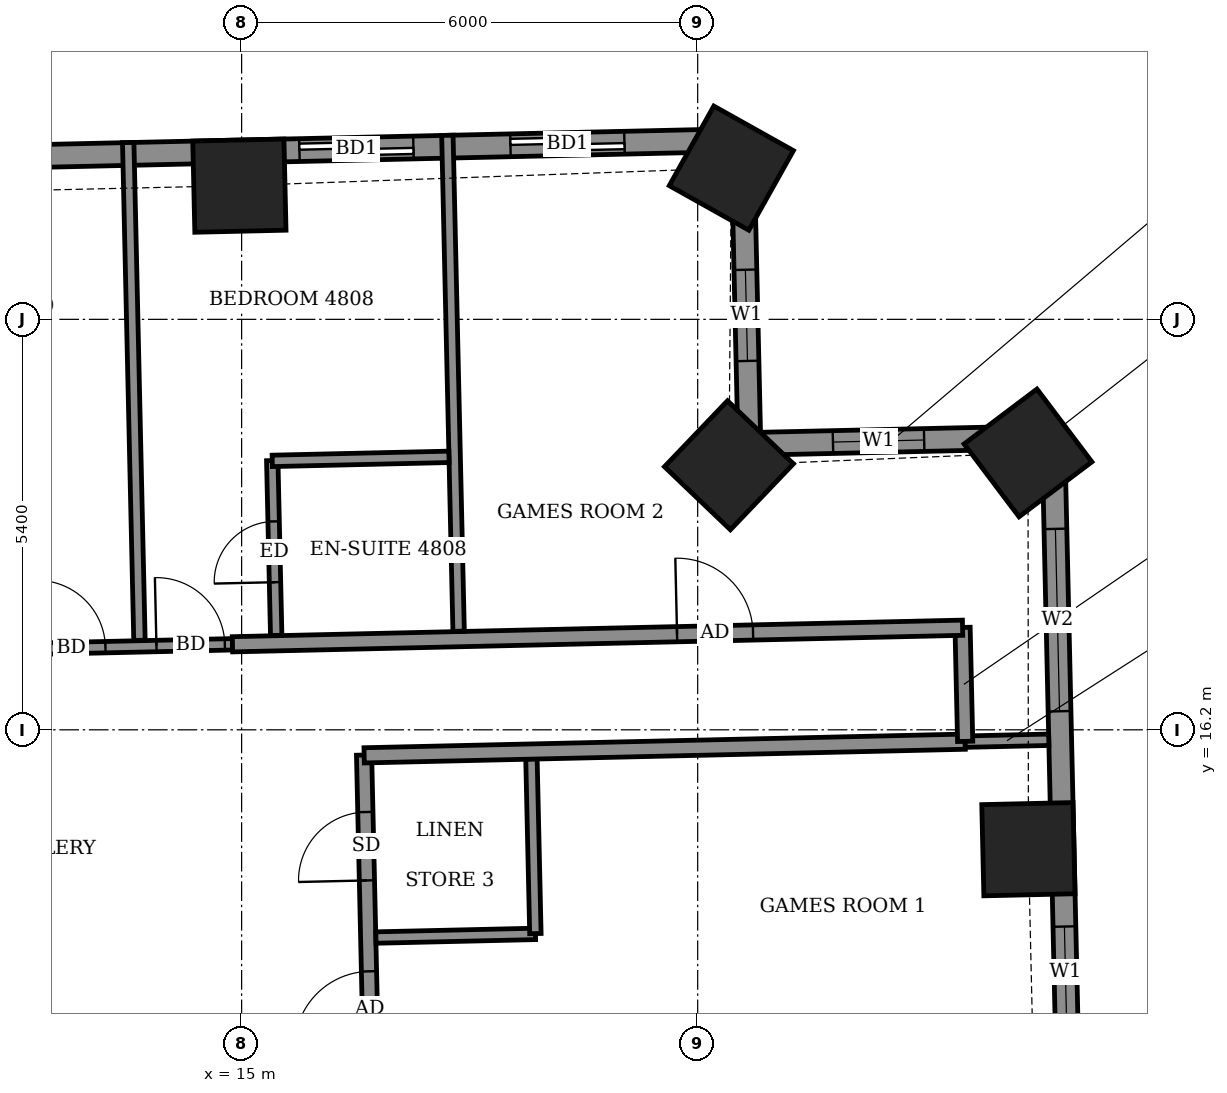
"""IFC4 building model, lengths in metres.
Left out: names, types, materials, properties, quantities, classifications, styles, units other than length and angle.
Written with IfcOpenShell. Run it as: python <this file> out.ifc"""

import sys

from ifc_helpers import new_model, si_unit, direction, frame, frame_2d, origin, origin_2d, place, context, subcontext, project, spatial, rectangle, extrude, element, fill, save


model = new_model("IFC4")
c1 = context("Model", 3, precision=1e-05, world=origin(), true_north=direction((0.0, 1.0)))
c2 = subcontext(c1, "Body", "Model", "MODEL_VIEW")
j1 = project(units=[si_unit("LENGTHUNIT", "METRE"), si_unit("PLANEANGLEUNIT", "RADIAN")], contexts=[c1])
p1 = place(None, origin())
s1 = spatial("IfcSite", under=j1, at=p1, CompositionType="ELEMENT")
p2 = place(p1, origin())
s2 = spatial("IfcBuilding", under=s1, at=p2, CompositionType="ELEMENT")
p3 = place(p2, frame((0.0, 0.0, 189.7)))
s3 = spatial("IfcBuildingStorey", under=s2, at=p3, CompositionType="ELEMENT", Elevation=189.7)
for number, where, z_axis, x_axis in (
    (1, (25.351, 14.629, -0.55), (0.0, 0.0, 1.0), (-0.023, 1.0, 0.0)),
    (2, (25.346, 19.843, -0.55), (0.0, 0.0, 1.0), (-0.602, 0.798, 0.0)),
    (3, (21.411, 19.68, -0.55), (0.0, 0.0, 1.0), (-0.723, 0.691, 0.0)),
    (4, (21.443, 23.589, -0.55), (0.0, 0.0, 1.0), (-0.873, 0.488, 0.0)),
    (5, (14.971, 23.359, -0.55), (0.0, 0.0, 1.0), (-1.0, -0.023, 0.0)),
):
    element("IfcColumn", number, at=place(p3, frame(where, z_axis=z_axis, x_axis=x_axis)), inside=s3, PredefinedType="COLUMN", context=c2, shape_type="SweptSolid", body=[
        extrude(rectangle(XDim=1.2, YDim=1.2, at=origin_2d()), origin(), (0.0, 0.0, 1.0), 3.6),
    ])
p4 = place(p3, frame((25.936, 8.697, 0.0), z_axis=(0.0, 0.0, 1.0), x_axis=(-0.022636437932, 0.99974376301, 0.0)))
e6 = element("IfcWall", 6, at=p4, inside=s3, PredefinedType="SOLIDWALL", context=c2, shape_type="SweptSolid", body=[
    extrude(rectangle(XDim=11.357, YDim=0.3, at=frame_2d((5.678, 0.0))), origin(), (0.0, 0.0, 1.0), 3.05),
])
p5 = place(p4, frame((1.161, 0.0, 0.0)))
e7 = element("IfcOpeningElement", 7, at=p5, cuts=e6, PredefinedType="OPENING", context=c2, shape_type="SweptSolid", body=[
    extrude(rectangle(XDim=1.5, YDim=2.4, at=frame_2d((0.75, 1.2))), frame((0.0, 0.16, 0.0), z_axis=(0.0, -1.0, 0.0), x_axis=(1.0, 0.0, 0.0)), (0.0, 0.0, 1.0), 0.32),
])
p6 = place(p4, frame((3.716, 0.0, 0.9)))
e8 = element("IfcOpeningElement", 8, at=p6, cuts=e6, PredefinedType="OPENING", context=c2, shape_type="SweptSolid", body=[
    extrude(rectangle(XDim=1.2, YDim=1.5, at=frame_2d((0.6, 0.75))), frame((0.0, 0.16, 0.0), z_axis=(0.0, -1.0, 0.0), x_axis=(1.0, 0.0, 0.0)), (0.0, 0.0, 1.0), 0.32),
])
p7 = place(p4, frame((7.749, 0.0, 0.9)))
e9 = element("IfcOpeningElement", 9, at=p7, cuts=e6, PredefinedType="OPENING", context=c2, shape_type="SweptSolid", body=[
    extrude(rectangle(XDim=2.4, YDim=1.5, at=frame_2d((1.2, 0.75))), frame((0.0, 0.16, 0.0), z_axis=(0.0, -1.0, 0.0), x_axis=(1.0, 0.0, 0.0)), (0.0, 0.0, 1.0), 0.32),
])
p8 = place(p3, frame((25.679, 20.051, 0.0), z_axis=(0.0, 0.0, 1.0), x_axis=(-0.999745614085, -0.022554536529, 0.0)))
e10 = element("IfcWall", 10, at=p8, inside=s3, PredefinedType="SOLIDWALL", context=c2, shape_type="SweptSolid", body=[
    extrude(rectangle(XDim=4.254, YDim=0.3, at=frame_2d((2.127, 0.0))), origin(), (0.0, 0.0, 1.0), 2.55),
])
p9 = place(p8, frame((1.7, 0.0, 0.9)))
e11 = element("IfcOpeningElement", 11, at=p9, cuts=e10, PredefinedType="OPENING", context=c2, shape_type="SweptSolid", body=[
    extrude(rectangle(XDim=1.2, YDim=1.5, at=frame_2d((0.6, 0.75))), frame((0.0, 0.16, 0.0), z_axis=(0.0, -1.0, 0.0), x_axis=(1.0, 0.0, 0.0)), (0.0, 0.0, 1.0), 0.32),
])
p10 = place(p3, frame((21.68, 19.96, 0.0), z_axis=(0.0, 0.0, 1.0), x_axis=(-0.022704768219, 0.999742213523, 0.0)))
e12 = element("IfcWall", 12, at=p10, inside=s3, PredefinedType="SOLIDWALL", context=c2, shape_type="SweptSolid", body=[
    extrude(rectangle(XDim=4.0, YDim=0.3, at=frame_2d((2.0, 0.0))), origin(), (0.0, 0.0, 1.0), 2.55),
])
p11 = place(p10, frame((1.093, 0.0, 0.9)))
e13 = element("IfcOpeningElement", 13, at=p11, cuts=e12, PredefinedType="OPENING", context=c2, shape_type="SweptSolid", body=[
    extrude(rectangle(XDim=1.2, YDim=1.5, at=frame_2d((0.6, 0.75))), frame((0.0, 0.16, 0.0), z_axis=(0.0, -1.0, 0.0), x_axis=(1.0, 0.0, 0.0)), (0.0, 0.0, 1.0), 0.32),
])
p12 = place(p3, frame((21.589, 23.959, 0.0), z_axis=(0.0, 0.0, 1.0), x_axis=(-0.999742668524, -0.022684724649, 0.0)))
e14 = element("IfcWall", 14, at=p12, inside=s3, PredefinedType="SOLIDWALL", context=c2, shape_type="SweptSolid", body=[
    extrude(rectangle(XDim=40.822, YDim=0.3, at=frame_2d((20.411, 0.0))), origin(), (0.0, 0.0, 1.0), 3.05),
])
p13 = place(p12, frame((1.553, 0.0, 0.0)))
e15 = element("IfcOpeningElement", 15, at=p13, cuts=e14, PredefinedType="OPENING", context=c2, shape_type="SweptSolid", body=[
    extrude(rectangle(XDim=1.5, YDim=2.4, at=frame_2d((0.75, 1.2))), frame((0.0, 0.16, 0.0), z_axis=(0.0, -1.0, 0.0), x_axis=(1.0, 0.0, 0.0)), (0.0, 0.0, 1.0), 0.32),
])
p14 = place(p12, frame((4.33, 0.0, 0.0)))
e16 = element("IfcOpeningElement", 16, at=p14, cuts=e14, PredefinedType="OPENING", context=c2, shape_type="SweptSolid", body=[
    extrude(rectangle(XDim=1.5, YDim=2.4, at=frame_2d((0.75, 1.2))), frame((0.0, 0.16, 0.0), z_axis=(0.0, -1.0, 0.0), x_axis=(1.0, 0.0, 0.0)), (0.0, 0.0, 1.0), 0.32),
])
p15 = place(p12, frame((9.43, 0.0, 0.0)))
e17 = element("IfcOpeningElement", 17, at=p15, cuts=e14, PredefinedType="OPENING", context=c2, shape_type="SweptSolid", body=[
    extrude(rectangle(XDim=1.5, YDim=2.4, at=frame_2d((0.75, 1.2))), frame((0.0, 0.16, 0.0), z_axis=(0.0, -1.0, 0.0), x_axis=(1.0, 0.0, 0.0)), (0.0, 0.0, 1.0), 0.32),
])
p16 = place(p12, frame((14.37, 0.0, 0.0)))
e18 = element("IfcOpeningElement", 18, at=p16, cuts=e14, PredefinedType="OPENING", context=c2, shape_type="SweptSolid", body=[
    extrude(rectangle(XDim=1.5, YDim=2.4, at=frame_2d((0.75, 1.2))), frame((0.0, 0.16, 0.0), z_axis=(0.0, -1.0, 0.0), x_axis=(1.0, 0.0, 0.0)), (0.0, 0.0, 1.0), 0.32),
])
p17 = place(p12, frame((17.41, 0.0, 0.0)))
e19 = element("IfcOpeningElement", 19, at=p17, cuts=e14, PredefinedType="OPENING", context=c2, shape_type="SweptSolid", body=[
    extrude(rectangle(XDim=1.5, YDim=2.4, at=frame_2d((0.75, 1.2))), frame((0.0, 0.16, 0.0), z_axis=(0.0, -1.0, 0.0), x_axis=(1.0, 0.0, 0.0)), (0.0, 0.0, 1.0), 0.32),
])
p18 = place(p12, frame((22.03, 0.0, 0.0)))
e20 = element("IfcOpeningElement", 20, at=p18, cuts=e14, PredefinedType="OPENING", context=c2, shape_type="SweptSolid", body=[
    extrude(rectangle(XDim=1.5, YDim=2.4, at=frame_2d((0.75, 1.2))), frame((0.0, 0.16, 0.0), z_axis=(0.0, -1.0, 0.0), x_axis=(1.0, 0.0, 0.0)), (0.0, 0.0, 1.0), 0.32),
])
p19 = place(p12, frame((27.7, 0.0, 0.0)))
e21 = element("IfcOpeningElement", 21, at=p19, cuts=e14, PredefinedType="OPENING", context=c2, shape_type="SweptSolid", body=[
    extrude(rectangle(XDim=1.2, YDim=2.4, at=frame_2d((0.6, 1.2))), frame((0.0, 0.16, 0.0), z_axis=(0.0, -1.0, 0.0), x_axis=(1.0, 0.0, 0.0)), (0.0, 0.0, 1.0), 0.32),
])
p20 = place(p12, frame((30.48, 0.0, 0.0)))
e22 = element("IfcOpeningElement", 22, at=p20, cuts=e14, PredefinedType="OPENING", context=c2, shape_type="SweptSolid", body=[
    extrude(rectangle(XDim=1.5, YDim=2.4, at=frame_2d((0.75, 1.2))), frame((0.0, 0.16, 0.0), z_axis=(0.0, -1.0, 0.0), x_axis=(1.0, 0.0, 0.0)), (0.0, 0.0, 1.0), 0.32),
])
p21 = place(p12, frame((35.065, 0.0, 0.0)))
e23 = element("IfcOpeningElement", 23, at=p21, cuts=e14, PredefinedType="OPENING", context=c2, shape_type="SweptSolid", body=[
    extrude(rectangle(XDim=1.5, YDim=2.4, at=frame_2d((0.75, 1.2))), frame((0.0, 0.16, 0.0), z_axis=(0.0, -1.0, 0.0), x_axis=(1.0, 0.0, 0.0)), (0.0, 0.0, 1.0), 0.32),
])
p22 = place(p12, frame((37.945, 0.0, 0.9)))
e24 = element("IfcOpeningElement", 24, at=p22, cuts=e14, PredefinedType="OPENING", context=c2, shape_type="SweptSolid", body=[
    extrude(rectangle(XDim=1.2, YDim=1.5, at=frame_2d((0.6, 0.75))), frame((0.0, 0.16, 0.0), z_axis=(0.0, -1.0, 0.0), x_axis=(1.0, 0.0, 0.0)), (0.0, 0.0, 1.0), 0.32),
])
p23 = place(p3, frame((16.797, 7.674, 0.0), z_axis=(0.0, 0.0, 1.0), x_axis=(-0.022698399288, 0.999742358145, 0.0)))
e25 = element("IfcWall", 25, at=p23, inside=s3, PredefinedType="PARTITIONING", context=c2, shape_type="SweptSolid", body=[
    extrude(rectangle(XDim=8.196, YDim=0.2, at=frame_2d((4.098, 0.0))), origin(), (0.0, 0.0, 1.0), 3.05),
])
p24 = place(p23, frame((1.539, 0.0, 0.0)))
e26 = element("IfcOpeningElement", 26, at=p24, cuts=e25, PredefinedType="OPENING", context=c2, shape_type="SweptSolid", body=[
    extrude(rectangle(XDim=1.0, YDim=2.1, at=frame_2d((0.5, 1.05))), frame((0.0, 0.11, 0.0), z_axis=(0.0, -1.0, 0.0), x_axis=(1.0, 0.0, 0.0)), (0.0, 0.0, 1.0), 0.22),
])
p25 = place(p23, frame((4.35, 0.0, 0.0)))
e27 = element("IfcOpeningElement", 27, at=p25, cuts=e25, PredefinedType="OPENING", context=c2, shape_type="SweptSolid", body=[
    extrude(rectangle(XDim=1.0, YDim=2.1, at=frame_2d((0.5, 1.05))), frame((0.0, 0.11, 0.0), z_axis=(0.0, -1.0, 0.0), x_axis=(1.0, 0.0, 0.0)), (0.0, 0.0, 1.0), 0.22),
])
p26 = place(p23, frame((6.546, 0.0, 0.0)))
e28 = element("IfcOpeningElement", 28, at=p26, cuts=e25, PredefinedType="OPENING", context=c2, shape_type="SweptSolid", body=[
    extrude(rectangle(XDim=0.9, YDim=2.1, at=frame_2d((0.45, 1.05))), frame((0.0, 0.11, 0.0), z_axis=(0.0, -1.0, 0.0), x_axis=(1.0, 0.0, 0.0)), (0.0, 0.0, 1.0), 0.22),
])
p27 = place(p3, frame((16.767, 13.467, 0.0), z_axis=(0.0, 0.0, 1.0), x_axis=(0.999740212033, 0.022792727877, 0.0)))
e29 = element("IfcWall", 29, at=p27, inside=s3, PredefinedType="PARTITIONING", context=c2, shape_type="SweptSolid", body=[
    extrude(rectangle(XDim=2.099, YDim=0.15, at=frame_2d((1.05, 0.0))), origin(), (0.0, 0.0, 1.0), 3.05),
])
p28 = place(p3, frame((18.865, 13.519, 0.0), z_axis=(0.0, 0.0, 1.0), x_axis=(-0.022612884682, 0.999744296031, 0.0)))
e30 = element("IfcWall", 30, at=p28, inside=s3, PredefinedType="PARTITIONING", context=c2, shape_type="SweptSolid", body=[
    extrude(rectangle(XDim=2.3, YDim=0.15, at=frame_2d((1.15, 0.0))), origin(), (0.0, 0.0, 1.0), 3.05),
])
p29 = place(p3, frame((16.612, 15.864, 0.0), z_axis=(0.0, 0.0, 1.0), x_axis=(0.999741181744, 0.022750154412, 0.0)))
e31 = element("IfcWall", 31, at=p29, inside=s3, PredefinedType="PARTITIONING", context=c2, shape_type="SweptSolid", body=[
    extrude(rectangle(XDim=7.909, YDim=0.2, at=frame_2d((3.955, 0.0))), origin(), (0.0, 0.0, 1.0), 3.05),
])
p30 = place(p3, frame((24.519, 16.044, 0.0), z_axis=(0.0, 0.0, 1.0), x_axis=(0.999738732953, 0.022857511541, 0.0)))
e32 = element("IfcWall", 32, at=p30, inside=s3, PredefinedType="PARTITIONING", context=c2, shape_type="SweptSolid", body=[
    extrude(rectangle(XDim=1.1, YDim=0.15, at=frame_2d((0.55, 0.0))), origin(), (0.0, 0.0, 1.0), 2.55),
])
p31 = place(p3, frame((24.519, 16.048, 0.0), z_axis=(0.0, 0.0, 1.0), x_axis=(-0.022632637625, 0.99974384905, 0.0)))
e33 = element("IfcWall", 33, at=p31, inside=s3, PredefinedType="PARTITIONING", context=c2, shape_type="SweptSolid", body=[
    extrude(rectangle(XDim=1.5, YDim=0.2, at=frame_2d((0.75, 0.0))), origin(), (0.0, 0.0, 1.0), 3.05),
])
p32 = place(p3, frame((-15.649, 16.633, 0.0), z_axis=(0.0, 0.0, 1.0), x_axis=(0.999743261737, 0.022658565952, 0.0)))
e34 = element("IfcWall", 34, at=p32, inside=s3, PredefinedType="PARTITIONING", context=c2, shape_type="SweptSolid", body=[
    extrude(rectangle(XDim=30.536, YDim=0.15, at=frame_2d((15.268, 0.0))), origin(), (0.0, 0.0, 1.0), 3.05),
])
p33 = place(p32, frame((29.536, 0.0, 0.0)))
e35 = element("IfcOpeningElement", 35, at=p33, cuts=e34, PredefinedType="OPENING", context=c2, shape_type="SweptSolid", body=[
    extrude(rectangle(XDim=0.9, YDim=2.1, at=frame_2d((0.45, 1.05))), frame((0.0, 0.085, 0.0), z_axis=(0.0, -1.0, 0.0), x_axis=(1.0, 0.0, 0.0)), (0.0, 0.0, 1.0), 0.17),
])
p34 = place(p32, frame((27.965, 0.0, 0.0)))
e36 = element("IfcOpeningElement", 36, at=p34, cuts=e34, PredefinedType="OPENING", context=c2, shape_type="SweptSolid", body=[
    extrude(rectangle(XDim=0.9, YDim=2.1, at=frame_2d((0.45, 1.05))), frame((0.0, 0.085, 0.0), z_axis=(0.0, -1.0, 0.0), x_axis=(1.0, 0.0, 0.0)), (0.0, 0.0, 1.0), 0.17),
])
p35 = place(p32, frame((21.365, 0.0, 0.0)))
e37 = element("IfcOpeningElement", 37, at=p35, cuts=e34, PredefinedType="OPENING", context=c2, shape_type="SweptSolid", body=[
    extrude(rectangle(XDim=0.9, YDim=2.1, at=frame_2d((0.45, 1.05))), frame((0.0, 0.085, 0.0), z_axis=(0.0, -1.0, 0.0), x_axis=(1.0, 0.0, 0.0)), (0.0, 0.0, 1.0), 0.17),
])
p36 = place(p32, frame((19.565, 0.0, 0.0)))
e38 = element("IfcOpeningElement", 38, at=p36, cuts=e34, PredefinedType="OPENING", context=c2, shape_type="SweptSolid", body=[
    extrude(rectangle(XDim=0.9, YDim=2.1, at=frame_2d((0.45, 1.05))), frame((0.0, 0.085, 0.0), z_axis=(0.0, -1.0, 0.0), x_axis=(1.0, 0.0, 0.0)), (0.0, 0.0, 1.0), 0.17),
])
p37 = place(p32, frame((12.965, 0.0, 0.0)))
e39 = element("IfcOpeningElement", 39, at=p37, cuts=e34, PredefinedType="OPENING", context=c2, shape_type="SweptSolid", body=[
    extrude(rectangle(XDim=0.9, YDim=2.1, at=frame_2d((0.45, 1.05))), frame((0.0, 0.085, 0.0), z_axis=(0.0, -1.0, 0.0), x_axis=(1.0, 0.0, 0.0)), (0.0, 0.0, 1.0), 0.17),
])
p38 = place(p32, frame((11.14, 0.0, 0.0)))
e40 = element("IfcOpeningElement", 40, at=p38, cuts=e34, PredefinedType="OPENING", context=c2, shape_type="SweptSolid", body=[
    extrude(rectangle(XDim=0.9, YDim=2.1, at=frame_2d((0.45, 1.05))), frame((0.0, 0.085, 0.0), z_axis=(0.0, -1.0, 0.0), x_axis=(1.0, 0.0, 0.0)), (0.0, 0.0, 1.0), 0.17),
])
p39 = place(p32, frame((4.515, 0.0, 0.0)))
e41 = element("IfcOpeningElement", 41, at=p39, cuts=e34, PredefinedType="OPENING", context=c2, shape_type="SweptSolid", body=[
    extrude(rectangle(XDim=0.9, YDim=2.1, at=frame_2d((0.45, 1.05))), frame((0.0, 0.085, 0.0), z_axis=(0.0, -1.0, 0.0), x_axis=(1.0, 0.0, 0.0)), (0.0, 0.0, 1.0), 0.17),
])
p40 = place(p32, frame((2.715, 0.0, 0.0)))
e42 = element("IfcOpeningElement", 42, at=p40, cuts=e34, PredefinedType="OPENING", context=c2, shape_type="SweptSolid", body=[
    extrude(rectangle(XDim=0.9, YDim=2.1, at=frame_2d((0.45, 1.05))), frame((0.0, 0.085, 0.0), z_axis=(0.0, -1.0, 0.0), x_axis=(1.0, 0.0, 0.0)), (0.0, 0.0, 1.0), 0.17),
])
p41 = place(p3, frame((14.88, 17.325, 0.0), z_axis=(0.0, 0.0, 1.0), x_axis=(0.999742504166, 0.022691966963, 0.0)))
e43 = element("IfcWall", 43, at=p41, inside=s3, PredefinedType="PARTITIONING", context=c2, shape_type="SweptSolid", body=[
    extrude(rectangle(XDim=9.608, YDim=0.2, at=frame_2d((4.804, 0.0))), origin(), (0.0, 0.0, 1.0), 3.05),
])
p42 = place(p41, frame((5.85, 0.0, 0.0)))
e44 = element("IfcOpeningElement", 44, at=p42, cuts=e43, PredefinedType="OPENING", context=c2, shape_type="SweptSolid", body=[
    extrude(rectangle(XDim=1.0, YDim=2.1, at=frame_2d((0.5, 1.05))), frame((0.0, 0.11, 0.0), z_axis=(0.0, -1.0, 0.0), x_axis=(1.0, 0.0, 0.0)), (0.0, 0.0, 1.0), 0.22),
])
p43 = place(p3, frame((13.656, 17.377, 0.0), z_axis=(0.0, 0.0, 1.0), x_axis=(-0.022585104341, 0.999744923999, 0.0)))
e45 = element("IfcWall", 45, at=p43, inside=s3, PredefinedType="PARTITIONING", context=c2, shape_type="SweptSolid", body=[
    extrude(rectangle(XDim=6.551, YDim=0.15, at=frame_2d((3.275, 0.0))), origin(), (0.0, 0.0, 1.0), 2.55),
])
p44 = place(p3, frame((15.455, 17.442, 0.0), z_axis=(0.0, 0.0, 1.0), x_axis=(-0.022603288534, 0.999744513037, 0.0)))
e46 = element("IfcWall", 46, at=p44, inside=s3, PredefinedType="PARTITIONING", context=c2, shape_type="SweptSolid", body=[
    extrude(rectangle(XDim=2.301, YDim=0.15, at=frame_2d((1.15, 0.0))), origin(), (0.0, 0.0, 1.0), 3.05),
])
p45 = place(p44, frame((0.7, 0.0, 0.0)))
e47 = element("IfcOpeningElement", 47, at=p45, cuts=e46, PredefinedType="OPENING", context=c2, shape_type="SweptSolid", body=[
    extrude(rectangle(XDim=0.8, YDim=2.1, at=frame_2d((0.4, 1.05))), frame((0.0, 0.085, 0.0), z_axis=(0.0, -1.0, 0.0), x_axis=(1.0, 0.0, 0.0)), (0.0, 0.0, 1.0), 0.17),
])
p46 = place(p3, frame((17.855, 17.497, 0.0), z_axis=(0.0, 0.0, 1.0), x_axis=(-0.022672114006, 0.999742954587, 0.0)))
e48 = element("IfcWall", 48, at=p46, inside=s3, PredefinedType="PARTITIONING", context=c2, shape_type="SweptSolid", body=[
    extrude(rectangle(XDim=6.526, YDim=0.15, at=frame_2d((3.263, 0.0))), origin(), (0.0, 0.0, 1.0), 2.55),
])
p47 = place(p3, frame((15.403, 19.738, 0.0), z_axis=(0.0, 0.0, 1.0), x_axis=(0.999740478815, 0.022781023197, 0.0)))
e49 = element("IfcWall", 49, at=p47, inside=s3, PredefinedType="PARTITIONING", context=c2, shape_type="SweptSolid", body=[
    extrude(rectangle(XDim=2.325, YDim=0.15, at=frame_2d((1.163, 0.0))), origin(), (0.0, 0.0, 1.0), 3.05),
])
p48 = place(p6, origin())
e50 = element("IfcWindow", 50, at=p48, inside=s3, PartitioningType="SINGLE_PANEL", PredefinedType="WINDOW", context=c2, shape_type="SweptSolid", body=[
    extrude(rectangle(XDim=1.2, YDim=1.5, at=frame_2d((0.6, 0.75))), frame((0.0, 0.03, 0.0), z_axis=(0.0, -1.0, 0.0), x_axis=(1.0, 0.0, 0.0)), (0.0, 0.0, 1.0), 0.06),
])
fill(e8, e50)
p49 = place(p7, origin())
e51 = element("IfcWindow", 51, at=p49, inside=s3, PartitioningType="DOUBLE_PANEL_VERTICAL", PredefinedType="WINDOW", context=c2, shape_type="SweptSolid", body=[
    extrude(rectangle(XDim=2.4, YDim=1.5, at=frame_2d((1.2, 0.75))), frame((0.0, 0.03, 0.0), z_axis=(0.0, -1.0, 0.0), x_axis=(1.0, 0.0, 0.0)), (0.0, 0.0, 1.0), 0.06),
])
fill(e9, e51)
p50 = place(p9, origin())
e52 = element("IfcWindow", 52, at=p50, inside=s3, PartitioningType="SINGLE_PANEL", PredefinedType="WINDOW", context=c2, shape_type="SweptSolid", body=[
    extrude(rectangle(XDim=1.2, YDim=1.5, at=frame_2d((0.6, 0.75))), frame((0.0, 0.03, 0.0), z_axis=(0.0, -1.0, 0.0), x_axis=(1.0, 0.0, 0.0)), (0.0, 0.0, 1.0), 0.06),
])
fill(e11, e52)
p51 = place(p11, origin())
e53 = element("IfcWindow", 53, at=p51, inside=s3, PartitioningType="SINGLE_PANEL", PredefinedType="WINDOW", context=c2, shape_type="SweptSolid", body=[
    extrude(rectangle(XDim=1.2, YDim=1.5, at=frame_2d((0.6, 0.75))), frame((0.0, 0.03, 0.0), z_axis=(0.0, -1.0, 0.0), x_axis=(1.0, 0.0, 0.0)), (0.0, 0.0, 1.0), 0.06),
])
fill(e13, e53)
p52 = place(p13, origin())
e54 = element("IfcDoor", 54, at=p52, inside=s3, OperationType="SLIDING_TO_LEFT", PredefinedType="DOOR", context=c2, shape_type="SweptSolid", body=[
    extrude(rectangle(XDim=1.5, YDim=2.4, at=frame_2d((0.75, 1.2))), frame((0.0, 0.025, 0.0), z_axis=(0.0, -1.0, 0.0), x_axis=(1.0, 0.0, 0.0)), (0.0, 0.0, 1.0), 0.05),
])
fill(e15, e54)
p53 = place(p14, origin())
e55 = element("IfcDoor", 55, at=p53, inside=s3, OperationType="SLIDING_TO_LEFT", PredefinedType="DOOR", context=c2, shape_type="SweptSolid", body=[
    extrude(rectangle(XDim=1.5, YDim=2.4, at=frame_2d((0.75, 1.2))), frame((0.0, 0.025, 0.0), z_axis=(0.0, -1.0, 0.0), x_axis=(1.0, 0.0, 0.0)), (0.0, 0.0, 1.0), 0.05),
])
fill(e16, e55)
p54 = place(p25, origin())
e56 = element("IfcDoor", 56, at=p54, inside=s3, OperationType="SINGLE_SWING_LEFT", PredefinedType="DOOR", context=c2, shape_type="SweptSolid", body=[
    extrude(rectangle(XDim=1.0, YDim=2.1, at=frame_2d((0.5, 1.05))), frame((0.0, 0.025, 0.0), z_axis=(0.0, -1.0, 0.0), x_axis=(1.0, 0.0, 0.0)), (0.0, 0.0, 1.0), 0.05),
])
fill(e27, e56)
p55 = place(p26, origin())
e57 = element("IfcDoor", 57, at=p55, inside=s3, OperationType="SINGLE_SWING_LEFT", PredefinedType="DOOR", context=c2, shape_type="SweptSolid", body=[
    extrude(rectangle(XDim=0.9, YDim=2.1, at=frame_2d((0.45, 1.05))), frame((0.0, 0.025, 0.0), z_axis=(0.0, -1.0, 0.0), x_axis=(1.0, 0.0, 0.0)), (0.0, 0.0, 1.0), 0.05),
])
fill(e28, e57)
p56 = place(p42, origin())
e58 = element("IfcDoor", 58, at=p56, inside=s3, OperationType="SINGLE_SWING_RIGHT", PredefinedType="DOOR", context=c2, shape_type="SweptSolid", body=[
    extrude(rectangle(XDim=1.0, YDim=2.1, at=frame_2d((0.5, 1.05))), frame((0.0, 0.025, 0.0), z_axis=(0.0, -1.0, 0.0), x_axis=(1.0, 0.0, 0.0)), (0.0, 0.0, 1.0), 0.05),
])
fill(e44, e58)
p57 = place(p33, origin())
e59 = element("IfcDoor", 59, at=p57, inside=s3, OperationType="SINGLE_SWING_RIGHT", PredefinedType="DOOR", context=c2, shape_type="SweptSolid", body=[
    extrude(rectangle(XDim=0.9, YDim=2.1, at=frame_2d((0.45, 1.05))), frame((0.0, 0.025, 0.0), z_axis=(0.0, -1.0, 0.0), x_axis=(1.0, 0.0, 0.0)), (0.0, 0.0, 1.0), 0.05),
])
fill(e35, e59)
p58 = place(p45, origin())
e60 = element("IfcDoor", 60, at=p58, inside=s3, OperationType="SINGLE_SWING_RIGHT", PredefinedType="DOOR", context=c2, shape_type="SweptSolid", body=[
    extrude(rectangle(XDim=0.8, YDim=2.1, at=frame_2d((0.4, 1.05))), frame((0.0, 0.025, 0.0), z_axis=(0.0, -1.0, 0.0), x_axis=(1.0, 0.0, 0.0)), (0.0, 0.0, 1.0), 0.05),
])
fill(e47, e60)
p59 = place(p34, origin())
e61 = element("IfcDoor", 61, at=p59, inside=s3, OperationType="SINGLE_SWING_LEFT", PredefinedType="DOOR", context=c2, shape_type="SweptSolid", body=[
    extrude(rectangle(XDim=0.9, YDim=2.1, at=frame_2d((0.45, 1.05))), frame((0.0, 0.025, 0.0), z_axis=(0.0, -1.0, 0.0), x_axis=(1.0, 0.0, 0.0)), (0.0, 0.0, 1.0), 0.05),
])
fill(e36, e61)
save(model, sys.argv[1])
